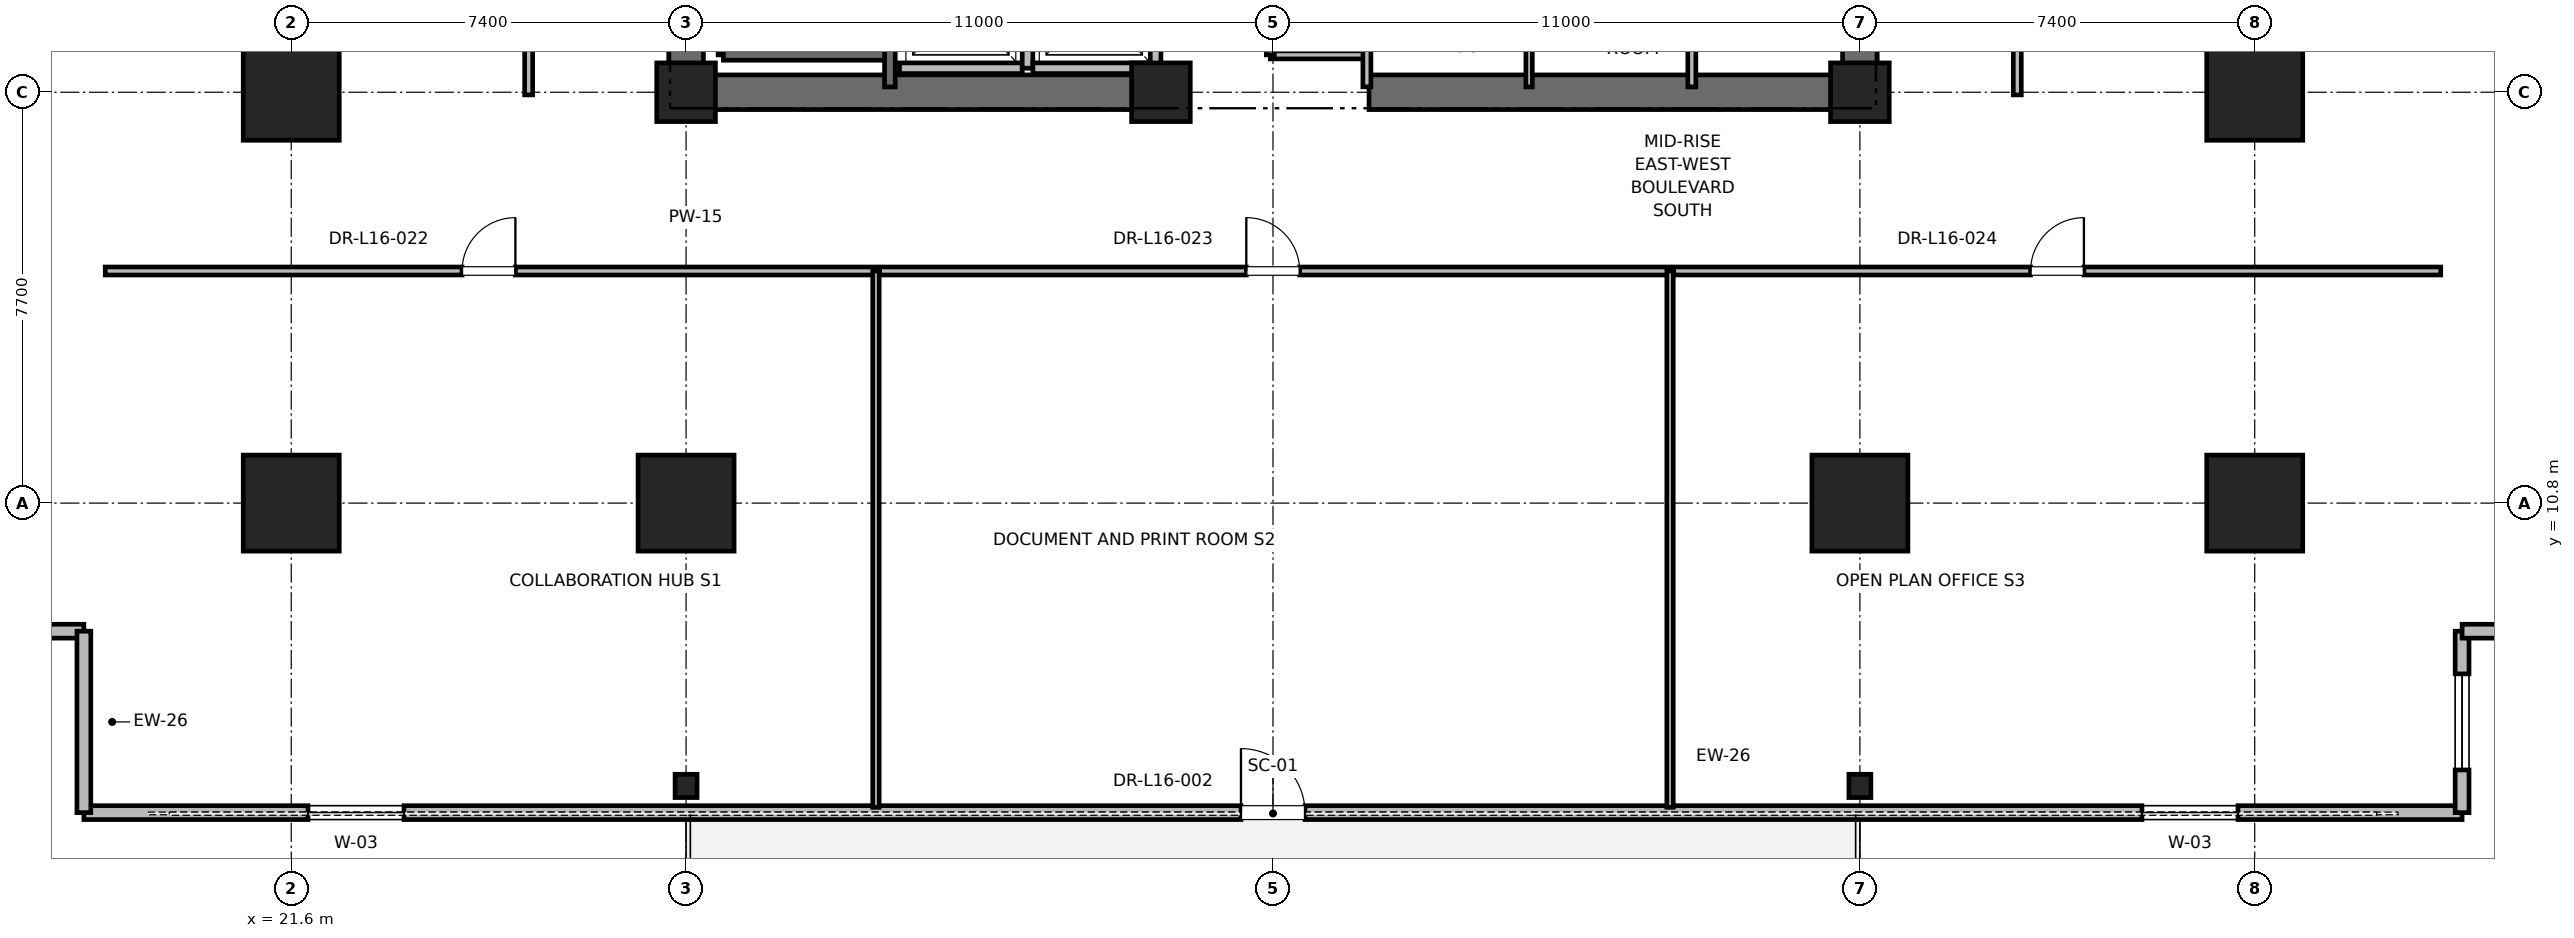
"""IFC4 building model, lengths in metres.
Left out: names, types, materials, properties, quantities, classifications, styles, units other than length and angle.
Written with IfcOpenShell. Run it as: python <this file> out.ifc"""

import sys

from ifc_helpers import new_model, si_unit, direction, frame, frame_2d, origin, origin_2d, place, context, subcontext, project, spatial, rectangle, i_section, extrude, element, fill, save


model = new_model("IFC4")
c1 = context("Model", 3, precision=1e-05, world=origin(), true_north=direction((0.0, 1.0)))
c2 = subcontext(c1, "Body", "Model", "MODEL_VIEW")
j1 = project(units=[si_unit("LENGTHUNIT", "METRE"), si_unit("PLANEANGLEUNIT", "RADIAN")], contexts=[c1])
p1 = place(None, origin())
s1 = spatial("IfcSite", under=j1, at=p1, CompositionType="ELEMENT")
p2 = place(p1, origin())
s2 = spatial("IfcBuilding", under=s1, at=p2, CompositionType="ELEMENT")
p3 = place(p2, frame((0.0, 0.0, 71.6)))
s3 = spatial("IfcBuildingStorey", under=s2, at=p3, CompositionType="ELEMENT", Elevation=71.6)
for number, where, z_axis, x_axis in (
    (1, (29.0, 10.8, 0.0), (0.0, 0.0, 1.0), (1.0, 0.0, 0.0)),
    (2, (51.0, 10.8, 0.0), (0.0, 0.0, 1.0), (1.0, 0.0, 0.0)),
    (3, (21.6, 18.5, 0.0), (0.0, 0.0, 1.0), (1.0, 0.0, 0.0)),
    (4, (58.4, 18.5, 0.0), (0.0, 0.0, 1.0), (1.0, 0.0, 0.0)),
    (5, (21.6, 10.8, 0.0), (0.0, 0.0, 1.0), (1.0, 0.0, 0.0)),
    (6, (58.4, 10.8, 0.0), (0.0, 0.0, 1.0), (1.0, 0.0, 0.0)),
):
    element("IfcColumn", number, at=place(p3, frame(where, z_axis=z_axis, x_axis=x_axis)), inside=s3, PredefinedType="COLUMN", context=c2, shape_type="SweptSolid", body=[
        extrude(rectangle(XDim=1.8, YDim=1.8, at=origin_2d()), origin(), (0.0, 0.0, 1.0), 4.0),
    ])
for number, where, z_axis, x_axis in (
    (7, (29.0, 5.5, 0.0), (0.0, 0.0, 1.0), (1.0, 0.0, 0.0)),
    (8, (51.0, 5.5, 0.0), (0.0, 0.0, 1.0), (1.0, 0.0, 0.0)),
):
    element("IfcColumn", number, at=place(p3, frame(where, z_axis=z_axis, x_axis=x_axis)), inside=s3, PredefinedType="COLUMN", context=c2, shape_type="SweptSolid", body=[
        extrude(i_section(OverallWidth=0.412, OverallDepth=0.437, WebThickness=0.036, FlangeThickness=0.058, FilletRadius=0.015, at=origin_2d()), origin(), (0.0, 0.0, 1.0), 4.0),
    ])
for number, where, z_axis, x_axis in (
    (9, (29.0, 18.5, 0.0), (0.0, 0.0, 1.0), (1.0, 0.0, 0.0)),
    (10, (51.0, 18.5, 0.0), (0.0, 0.0, 1.0), (1.0, 0.0, 0.0)),
    (11, (37.9, 18.5, 0.0), (0.0, 0.0, 1.0), (1.0, 0.0, 0.0)),
):
    element("IfcColumn", number, at=place(p3, frame(where, z_axis=z_axis, x_axis=x_axis)), inside=s3, PredefinedType="PILASTER", context=c2, shape_type="SweptSolid", body=[
        extrude(rectangle(XDim=1.1, YDim=1.1, at=origin_2d()), origin(), (0.0, 0.0, 1.0), 4.0),
    ])
for number, where, z_axis, x_axis in (
    (12, (29.0, 18.5, 0.0), (0.0, 0.0, 1.0), (1.0, 0.0, 0.0)),
    (13, (41.8, 18.5, 0.0), (0.0, 0.0, 1.0), (1.0, 0.0, 0.0)),
):
    element("IfcWall", number, at=place(p3, frame(where, z_axis=z_axis, x_axis=x_axis)), inside=s3, PredefinedType="SHEAR", context=c2, shape_type="SweptSolid", body=[
        extrude(rectangle(XDim=9.2, YDim=0.65, at=frame_2d((4.6, 0.0))), origin(), (0.0, 0.0, 1.0), 3.76),
    ])
p4 = place(p3, frame((29.0, 18.5, 0.0), z_axis=(0.0, 0.0, 1.0), x_axis=(0.0, 1.0, 0.0)))
e14 = element("IfcWall", 14, at=p4, inside=s3, PredefinedType="SHEAR", context=c2, shape_type="SweptSolid", body=[
    extrude(rectangle(XDim=8.8, YDim=0.65, at=frame_2d((4.4, 0.0))), origin(), (0.0, 0.0, 1.0), 3.76),
])
p5 = place(p3, frame((51.0, 18.5, 0.0), z_axis=(0.0, 0.0, 1.0), x_axis=(0.0, 1.0, 0.0)))
e15 = element("IfcWall", 15, at=p5, inside=s3, PredefinedType="SHEAR", context=c2, shape_type="SweptSolid", body=[
    extrude(rectangle(XDim=5.8, YDim=0.65, at=frame_2d((2.9, 0.0))), origin(), (0.0, 0.0, 1.0), 3.76),
])
p6 = place(p3, frame((17.714, 5.0, 0.0), z_axis=(0.0, 0.0, 1.0), x_axis=(1.0, 0.0, 0.0)))
e16 = element("IfcWall", 16, at=p6, inside=s3, PredefinedType="PARAPET", context=c2, shape_type="SweptSolid", body=[
    extrude(rectangle(XDim=44.573, YDim=0.26, at=frame_2d((22.286, 0.0))), origin(), (0.0, 0.0, 1.0), 2.889),
])
p7 = place(p6, frame((4.2, 0.0, 0.85)))
e17 = element("IfcOpeningElement", 17, at=p7, cuts=e16, PredefinedType="OPENING", context=c2, shape_type="SweptSolid", body=[
    extrude(rectangle(XDim=1.8, YDim=2.2, at=frame_2d((0.9, 1.1))), frame((0.0, 0.13, 0.0), z_axis=(0.0, -1.0, 0.0), x_axis=(1.0, 0.0, 0.0)), (0.0, 0.0, 1.0), 0.26),
])
p8 = place(p6, frame((21.686, 0.0, 0.0)))
e18 = element("IfcOpeningElement", 18, at=p8, cuts=e16, PredefinedType="OPENING", context=c2, shape_type="SweptSolid", body=[
    extrude(rectangle(XDim=1.2, YDim=2.2, at=frame_2d((0.6, 1.1))), frame((0.0, 0.13, 0.0), z_axis=(0.0, -1.0, 0.0), x_axis=(1.0, 0.0, 0.0)), (0.0, 0.0, 1.0), 0.26),
])
p9 = place(p6, frame((38.573, 0.0, 0.85)))
e19 = element("IfcOpeningElement", 19, at=p9, cuts=e16, PredefinedType="OPENING", context=c2, shape_type="SweptSolid", body=[
    extrude(rectangle(XDim=1.8, YDim=2.2, at=frame_2d((0.9, 1.1))), frame((0.0, 0.13, 0.0), z_axis=(0.0, -1.0, 0.0), x_axis=(1.0, 0.0, 0.0)), (0.0, 0.0, 1.0), 0.26),
])
p10 = place(p3, frame((13.914, 8.399, 0.0), z_axis=(0.0, 0.0, 1.0), x_axis=(1.0, 0.0, 0.0)))
e20 = element("IfcWall", 20, at=p10, inside=s3, PredefinedType="PARAPET", context=c2, shape_type="SweptSolid", body=[
    extrude(rectangle(XDim=3.8, YDim=0.26, at=frame_2d((1.9, 0.0))), origin(), (0.0, 0.0, 1.0), 3.76),
])
p11 = place(p10, frame((1.0, 0.0, 0.85)))
e21 = element("IfcOpeningElement", 21, at=p11, cuts=e20, PredefinedType="OPENING", context=c2, shape_type="SweptSolid", body=[
    extrude(rectangle(XDim=1.8, YDim=2.2, at=frame_2d((0.9, 1.1))), frame((0.0, 0.13, 0.0), z_axis=(0.0, -1.0, 0.0), x_axis=(1.0, 0.0, 0.0)), (0.0, 0.0, 1.0), 0.26),
])
p12 = place(p3, frame((17.714, 8.399, 0.0), z_axis=(0.0, 0.0, 1.0), x_axis=(0.0, -1.0, 0.0)))
e22 = element("IfcWall", 22, at=p12, inside=s3, PredefinedType="PARAPET", context=c2, shape_type="SweptSolid", body=[
    extrude(rectangle(XDim=3.4, YDim=0.26, at=frame_2d((1.7, 0.0))), origin(), (0.0, 0.0, 1.0), 3.76),
])
p13 = place(p3, frame((62.286, 5.0, 0.0), z_axis=(0.0, 0.0, 1.0), x_axis=(0.0, 1.0, 0.0)))
e23 = element("IfcWall", 23, at=p13, inside=s3, PredefinedType="PARAPET", context=c2, shape_type="SweptSolid", body=[
    extrude(rectangle(XDim=3.4, YDim=0.26, at=frame_2d((1.7, 0.0))), origin(), (0.0, 0.0, 1.0), 3.76),
])
p14 = place(p13, frame((0.8, 0.0, 0.85)))
e24 = element("IfcOpeningElement", 24, at=p14, cuts=e23, PredefinedType="OPENING", context=c2, shape_type="SweptSolid", body=[
    extrude(rectangle(XDim=1.8, YDim=2.2, at=frame_2d((0.9, 1.1))), frame((0.0, 0.13, 0.0), z_axis=(0.0, -1.0, 0.0), x_axis=(1.0, 0.0, 0.0)), (0.0, 0.0, 1.0), 0.26),
])
p15 = place(p3, frame((62.286, 8.399, 0.0), z_axis=(0.0, 0.0, 1.0), x_axis=(1.0, 0.0, 0.0)))
e25 = element("IfcWall", 25, at=p15, inside=s3, PredefinedType="PARAPET", context=c2, shape_type="SweptSolid", body=[
    extrude(rectangle(XDim=3.8, YDim=0.26, at=frame_2d((1.9, 0.0))), origin(), (0.0, 0.0, 1.0), 3.76),
])
p16 = place(p3, frame((29.7, 19.2, 0.0), z_axis=(0.0, 0.0, 1.0), x_axis=(0.0, 1.0, 0.0)))
e26 = element("IfcWall", 26, at=p16, inside=s3, PredefinedType="SOLIDWALL", context=c2, shape_type="SweptSolid", body=[
    extrude(rectangle(XDim=8.15, YDim=0.2, at=frame_2d((4.075, 0.0))), origin(), (0.0, 0.0, 1.0), 3.76),
])
p17 = place(p3, frame((29.7, 19.2, 0.0), z_axis=(0.0, 0.0, 1.0), x_axis=(1.0, 0.0, 0.0)))
e27 = element("IfcWall", 27, at=p17, inside=s3, PredefinedType="SOLIDWALL", context=c2, shape_type="SweptSolid", body=[
    extrude(rectangle(XDim=3.12, YDim=0.2, at=frame_2d((1.56, 0.0))), origin(), (0.0, 0.0, 1.0), 3.76),
])
p18 = place(p3, frame((32.82, 18.6, 0.0), z_axis=(0.0, 0.0, 1.0), x_axis=(0.0, 1.0, 0.0)))
e28 = element("IfcWall", 28, at=p18, inside=s3, PredefinedType="SOLIDWALL", context=c2, shape_type="SweptSolid", body=[
    extrude(rectangle(XDim=8.78, YDim=0.2, at=frame_2d((4.39, 0.0))), origin(), (0.0, 0.0, 1.0), 3.76),
])
p19 = place(p3, frame((33.0, 18.95, 0.0), z_axis=(0.0, 0.0, 1.0), x_axis=(1.0, 0.0, 0.0)))
e29 = element("IfcWall", 29, at=p19, inside=s3, PredefinedType="SOLIDWALL", context=c2, shape_type="SweptSolid", body=[
    extrude(rectangle(XDim=2.3, YDim=0.2, at=frame_2d((1.15, 0.0))), origin(), (0.0, 0.0, 1.0), 3.76),
])
p20 = place(p3, frame((35.4, 18.95, 0.0), z_axis=(0.0, 0.0, 1.0), x_axis=(0.0, 1.0, 0.0)))
e30 = element("IfcWall", 30, at=p20, inside=s3, PredefinedType="SOLIDWALL", context=c2, shape_type="SweptSolid", body=[
    extrude(rectangle(XDim=2.6, YDim=0.2, at=frame_2d((1.3, 0.0))), origin(), (0.0, 0.0, 1.0), 3.76),
])
p21 = place(p3, frame((35.5, 18.95, 0.0), z_axis=(0.0, 0.0, 1.0), x_axis=(1.0, 0.0, 0.0)))
e31 = element("IfcWall", 31, at=p21, inside=s3, PredefinedType="SOLIDWALL", context=c2, shape_type="SweptSolid", body=[
    extrude(rectangle(XDim=2.3, YDim=0.2, at=frame_2d((1.15, 0.0))), origin(), (0.0, 0.0, 1.0), 2.54),
])
p22 = place(p3, frame((37.8, 18.95, 0.0), z_axis=(0.0, 0.0, 1.0), x_axis=(0.0, 1.0, 0.0)))
e32 = element("IfcWall", 32, at=p22, inside=s3, PredefinedType="SOLIDWALL", context=c2, shape_type="SweptSolid", body=[
    extrude(rectangle(XDim=2.6, YDim=0.2, at=frame_2d((1.3, 0.0))), origin(), (0.0, 0.0, 1.0), 2.54),
])
p23 = place(p3, frame((39.95, 19.2, 0.0), z_axis=(0.0, 0.0, 1.0), x_axis=(1.0, 0.0, 0.0)))
e33 = element("IfcWall", 33, at=p23, inside=s3, PredefinedType="PARTITIONING", context=c2, shape_type="SweptSolid", body=[
    extrude(rectangle(XDim=1.81, YDim=0.15, at=frame_2d((0.905, 0.0))), origin(), (0.0, 0.0, 1.0), 2.85),
])
p24 = place(p3, frame((41.76, 18.6, 0.0), z_axis=(0.0, 0.0, 1.0), x_axis=(0.0, 1.0, 0.0)))
e34 = element("IfcWall", 34, at=p24, inside=s3, PredefinedType="PARTITIONING", context=c2, shape_type="SweptSolid", body=[
    extrude(rectangle(XDim=3.6, YDim=0.15, at=frame_2d((1.8, 0.0))), origin(), (0.0, 0.0, 1.0), 2.54),
])
p25 = place(p3, frame((39.95, 19.2, 0.0), z_axis=(0.0, 0.0, 1.0), x_axis=(0.0, 1.0, 0.0)))
e35 = element("IfcWall", 35, at=p25, inside=s3, PredefinedType="PARTITIONING", context=c2, shape_type="SweptSolid", body=[
    extrude(rectangle(XDim=3.0, YDim=0.15, at=frame_2d((1.5, 0.0))), origin(), (0.0, 0.0, 1.0), 2.85),
])
p26 = place(p25, frame((1.05, 0.0, 0.0)))
e36 = element("IfcOpeningElement", 36, at=p26, cuts=e35, PredefinedType="OPENING", context=c2, shape_type="SweptSolid", body=[
    extrude(rectangle(XDim=0.9, YDim=2.1, at=frame_2d((0.45, 1.05))), frame((0.0, 0.075, 0.0), z_axis=(0.0, -1.0, 0.0), x_axis=(1.0, 0.0, 0.0)), (0.0, 0.0, 1.0), 0.15),
])
p27 = place(p3, frame((47.85, 18.6, 0.0), z_axis=(0.0, 0.0, 1.0), x_axis=(0.0, 1.0, 0.0)))
e37 = element("IfcWall", 37, at=p27, inside=s3, PredefinedType="PARTITIONING", context=c2, shape_type="SweptSolid", body=[
    extrude(rectangle(XDim=2.54, YDim=0.15, at=frame_2d((1.27, 0.0))), origin(), (0.0, 0.0, 1.0), 2.85),
])
p28 = place(p3, frame((44.8, 18.6, 0.0), z_axis=(0.0, 0.0, 1.0), x_axis=(0.0, 1.0, 0.0)))
e38 = element("IfcWall", 38, at=p28, inside=s3, PredefinedType="PARTITIONING", context=c2, shape_type="SweptSolid", body=[
    extrude(rectangle(XDim=3.02, YDim=0.12, at=frame_2d((1.51, 0.0))), origin(), (0.0, 0.0, 1.0), 2.85),
])
p29 = place(p3, frame((18.114, 15.15, 0.0), z_axis=(0.0, 0.0, 1.0), x_axis=(1.0, 0.0, 0.0)))
e39 = element("IfcWall", 39, at=p29, inside=s3, PredefinedType="PARTITIONING", context=c2, shape_type="SweptSolid", body=[
    extrude(rectangle(XDim=14.445, YDim=0.15, at=frame_2d((7.223, 0.0))), origin(), (0.0, 0.0, 1.0), 2.85),
])
p30 = place(p29, frame((6.688, 0.0, 0.0)))
e40 = element("IfcOpeningElement", 40, at=p30, cuts=e39, PredefinedType="OPENING", context=c2, shape_type="SweptSolid", body=[
    extrude(rectangle(XDim=1.0, YDim=2.15, at=frame_2d((0.5, 1.075))), frame((0.0, 0.075, 0.0), z_axis=(0.0, -1.0, 0.0), x_axis=(1.0, 0.0, 0.0)), (0.0, 0.0, 1.0), 0.15),
])
p31 = place(p3, frame((32.559, 5.1, 0.0), z_axis=(0.0, 0.0, 1.0), x_axis=(0.0, 1.0, 0.0)))
e41 = element("IfcWall", 41, at=p31, inside=s3, PredefinedType="PARTITIONING", context=c2, shape_type="SweptSolid", body=[
    extrude(rectangle(XDim=10.05, YDim=0.12, at=frame_2d((5.025, 0.0))), origin(), (0.0, 0.0, 1.0), 2.39),
])
p32 = place(p3, frame((32.629, 15.15, 0.0), z_axis=(0.0, 0.0, 1.0), x_axis=(1.0, 0.0, 0.0)))
e42 = element("IfcWall", 42, at=p32, inside=s3, PredefinedType="PARTITIONING", context=c2, shape_type="SweptSolid", body=[
    extrude(rectangle(XDim=14.813, YDim=0.15, at=frame_2d((7.406, 0.0))), origin(), (0.0, 0.0, 1.0), 2.85),
])
p33 = place(p32, frame((6.871, 0.0, 0.0)))
e43 = element("IfcOpeningElement", 43, at=p33, cuts=e42, PredefinedType="OPENING", context=c2, shape_type="SweptSolid", body=[
    extrude(rectangle(XDim=1.0, YDim=2.15, at=frame_2d((0.5, 1.075))), frame((0.0, 0.075, 0.0), z_axis=(0.0, -1.0, 0.0), x_axis=(1.0, 0.0, 0.0)), (0.0, 0.0, 1.0), 0.15),
])
p34 = place(p3, frame((47.441, 5.1, 0.0), z_axis=(0.0, 0.0, 1.0), x_axis=(0.0, 1.0, 0.0)))
e44 = element("IfcWall", 44, at=p34, inside=s3, PredefinedType="PARTITIONING", context=c2, shape_type="SweptSolid", body=[
    extrude(rectangle(XDim=10.05, YDim=0.12, at=frame_2d((5.025, 0.0))), origin(), (0.0, 0.0, 1.0), 2.39),
])
p35 = place(p3, frame((47.511, 15.15, 0.0), z_axis=(0.0, 0.0, 1.0), x_axis=(1.0, 0.0, 0.0)))
e45 = element("IfcWall", 45, at=p35, inside=s3, PredefinedType="PARTITIONING", context=c2, shape_type="SweptSolid", body=[
    extrude(rectangle(XDim=14.375, YDim=0.15, at=frame_2d((7.188, 0.0))), origin(), (0.0, 0.0, 1.0), 2.85),
])
p36 = place(p35, frame((6.688, 0.0, 0.0)))
e46 = element("IfcOpeningElement", 46, at=p36, cuts=e45, PredefinedType="OPENING", context=c2, shape_type="SweptSolid", body=[
    extrude(rectangle(XDim=1.0, YDim=2.15, at=frame_2d((0.5, 1.075))), frame((0.0, 0.075, 0.0), z_axis=(0.0, -1.0, 0.0), x_axis=(1.0, 0.0, 0.0)), (0.0, 0.0, 1.0), 0.15),
])
p37 = place(p3, frame((26.05, 18.45, 0.0), z_axis=(0.0, 0.0, 1.0), x_axis=(0.0, 1.0, 0.0)))
e47 = element("IfcWall", 47, at=p37, inside=s3, PredefinedType="PARTITIONING", context=c2, shape_type="SweptSolid", body=[
    extrude(rectangle(XDim=7.602, YDim=0.15, at=frame_2d((3.801, 0.0))), origin(), (0.0, 0.0, 1.0), 2.85),
])
p38 = place(p37, frame((3.316, 0.0, 0.0)))
e48 = element("IfcOpeningElement", 48, at=p38, cuts=e47, PredefinedType="OPENING", context=c2, shape_type="SweptSolid", body=[
    extrude(rectangle(XDim=1.05, YDim=2.2, at=frame_2d((0.525, 1.1))), frame((0.0, 0.075, 0.0), z_axis=(0.0, -1.0, 0.0), x_axis=(1.0, 0.0, 0.0)), (0.0, 0.0, 1.0), 0.15),
])
p39 = place(p3, frame((53.95, 18.45, 0.0), z_axis=(0.0, 0.0, 1.0), x_axis=(0.0, 1.0, 0.0)))
e49 = element("IfcWall", 49, at=p39, inside=s3, PredefinedType="PARTITIONING", context=c2, shape_type="SweptSolid", body=[
    extrude(rectangle(XDim=10.498, YDim=0.15, at=frame_2d((5.249, 0.0))), origin(), (0.0, 0.0, 1.0), 2.85),
])
p40 = place(p39, frame((4.789, 0.0, 0.0)))
e50 = element("IfcOpeningElement", 50, at=p40, cuts=e49, PredefinedType="OPENING", context=c2, shape_type="SweptSolid", body=[
    extrude(rectangle(XDim=1.0, YDim=2.15, at=frame_2d((0.5, 1.075))), frame((0.0, 0.075, 0.0), z_axis=(0.0, -1.0, 0.0), x_axis=(1.0, 0.0, 0.0)), (0.0, 0.0, 1.0), 0.15),
])
p41 = place(p7, origin())
e51 = element("IfcWindow", 51, at=p41, inside=s3, PartitioningType="SINGLE_PANEL", PredefinedType="WINDOW", context=c2, shape_type="SweptSolid", body=[
    extrude(rectangle(XDim=1.8, YDim=2.2, at=frame_2d((0.9, 1.1))), frame((0.0, 0.03, 0.0), z_axis=(0.0, -1.0, 0.0), x_axis=(1.0, 0.0, 0.0)), (0.0, 0.0, 1.0), 0.06),
])
fill(e17, e51)
p42 = place(p8, origin())
e52 = element("IfcDoor", 52, at=p42, inside=s3, OperationType="SINGLE_SWING_LEFT", PredefinedType="DOOR", context=c2, shape_type="SweptSolid", body=[
    extrude(rectangle(XDim=1.2, YDim=2.2, at=frame_2d((0.6, 1.1))), frame((0.0, 0.025, 0.0), z_axis=(0.0, -1.0, 0.0), x_axis=(1.0, 0.0, 0.0)), (0.0, 0.0, 1.0), 0.05),
])
fill(e18, e52)
p43 = place(p9, origin())
e53 = element("IfcWindow", 53, at=p43, inside=s3, PartitioningType="SINGLE_PANEL", PredefinedType="WINDOW", context=c2, shape_type="SweptSolid", body=[
    extrude(rectangle(XDim=1.8, YDim=2.2, at=frame_2d((0.9, 1.1))), frame((0.0, 0.03, 0.0), z_axis=(0.0, -1.0, 0.0), x_axis=(1.0, 0.0, 0.0)), (0.0, 0.0, 1.0), 0.06),
])
fill(e19, e53)
p44 = place(p14, origin())
e54 = element("IfcWindow", 54, at=p44, inside=s3, PartitioningType="SINGLE_PANEL", PredefinedType="WINDOW", context=c2, shape_type="SweptSolid", body=[
    extrude(rectangle(XDim=1.8, YDim=2.2, at=frame_2d((0.9, 1.1))), frame((0.0, 0.03, 0.0), z_axis=(0.0, -1.0, 0.0), x_axis=(1.0, 0.0, 0.0)), (0.0, 0.0, 1.0), 0.06),
])
fill(e24, e54)
p45 = place(p30, origin())
e55 = element("IfcDoor", 55, at=p45, inside=s3, OperationType="SINGLE_SWING_RIGHT", PredefinedType="DOOR", context=c2, shape_type="SweptSolid", body=[
    extrude(rectangle(XDim=1.0, YDim=2.15, at=frame_2d((0.5, 1.075))), frame((0.0, 0.025, 0.0), z_axis=(0.0, -1.0, 0.0), x_axis=(1.0, 0.0, 0.0)), (0.0, 0.0, 1.0), 0.05),
])
fill(e40, e55)
p46 = place(p33, origin())
e56 = element("IfcDoor", 56, at=p46, inside=s3, OperationType="SINGLE_SWING_LEFT", PredefinedType="DOOR", context=c2, shape_type="SweptSolid", body=[
    extrude(rectangle(XDim=1.0, YDim=2.15, at=frame_2d((0.5, 1.075))), frame((0.0, 0.025, 0.0), z_axis=(0.0, -1.0, 0.0), x_axis=(1.0, 0.0, 0.0)), (0.0, 0.0, 1.0), 0.05),
])
fill(e43, e56)
p47 = place(p36, origin())
e57 = element("IfcDoor", 57, at=p47, inside=s3, OperationType="SINGLE_SWING_RIGHT", PredefinedType="DOOR", context=c2, shape_type="SweptSolid", body=[
    extrude(rectangle(XDim=1.0, YDim=2.15, at=frame_2d((0.5, 1.075))), frame((0.0, 0.025, 0.0), z_axis=(0.0, -1.0, 0.0), x_axis=(1.0, 0.0, 0.0)), (0.0, 0.0, 1.0), 0.05),
])
fill(e46, e57)
save(model, sys.argv[1])
